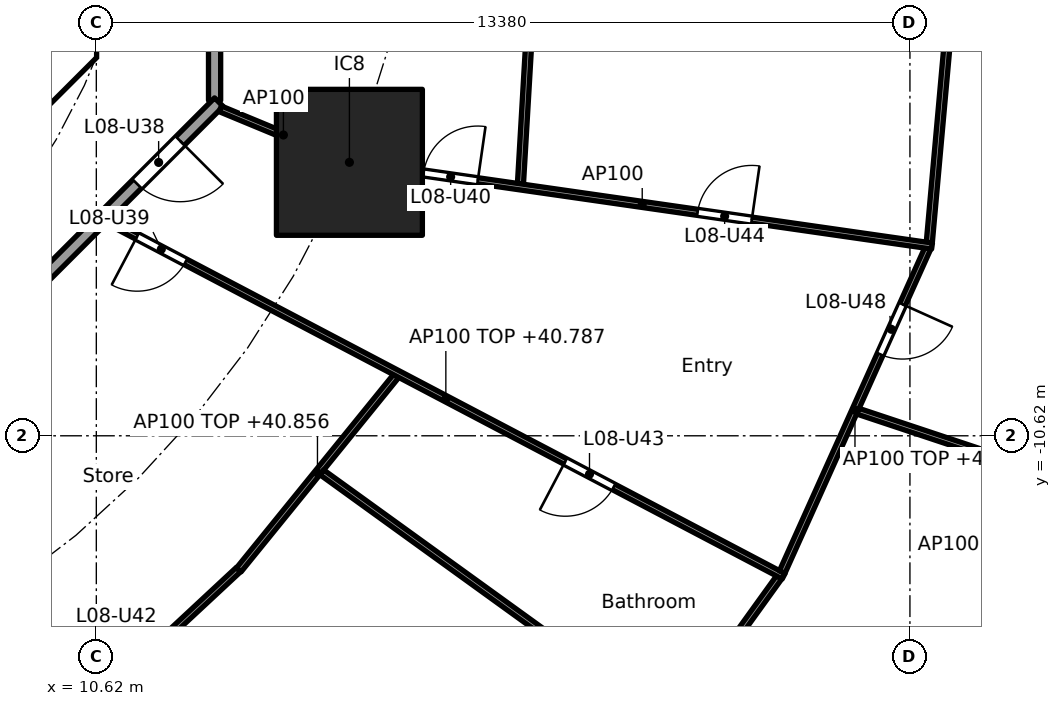
"""IFC4 building model, lengths in metres.
Left out: names, types, materials, properties, quantities, classifications, styles, units other than length and angle.
Written with IfcOpenShell. Run it as: python <this file> out.ifc"""

import sys

from ifc_helpers import new_model, si_unit, direction, frame, frame_2d, origin, origin_2d, place, context, subcontext, project, spatial, polyline, rectangle, outline, extrude, element, fill, save


model = new_model("IFC4")
c1 = context("Model", 3, precision=1e-05, world=origin(), true_north=direction((0.0, 1.0)))
c2 = subcontext(c1, "Body", "Model", "MODEL_VIEW")
j1 = project(units=[si_unit("LENGTHUNIT", "METRE"), si_unit("PLANEANGLEUNIT", "RADIAN")], contexts=[c1])
p1 = place(None, origin())
s1 = spatial("IfcSite", under=j1, at=p1, CompositionType="ELEMENT")
p2 = place(p1, origin())
s2 = spatial("IfcBuilding", under=s1, at=p2, CompositionType="ELEMENT")
p3 = place(p2, frame((0.0, 0.0, 38.1)))
s3 = spatial("IfcBuildingStorey", under=s2, at=p3, CompositionType="ELEMENT", Elevation=38.1)
p4 = place(p3, frame((14.782, -6.123, 0.0), z_axis=(0.0, 0.0, 1.0), x_axis=(1.0, 0.0, 0.0)))
e1 = element("IfcColumn", 1, at=p4, inside=s3, PredefinedType="COLUMN", context=c2, shape_type="SweptSolid", body=[
    extrude(rectangle(XDim=2.4, YDim=2.4, at=origin_2d()), origin(), (0.0, 0.0, 1.0), 3.7),
])
p5 = place(p3, frame((4.613, -9.988, 0.0), z_axis=(0.0, 0.0, 1.0), x_axis=(0.707106781187, 0.707106781187, 0.0)))
e2 = element("IfcWall", 2, at=p5, inside=s3, PredefinedType="SHEAR", context=c2, shape_type="SweptSolid", body=[
    extrude(rectangle(XDim=7.602, YDim=0.6, at=frame_2d((3.801, 0.0))), origin(), (0.0, 0.0, 1.0), 3.44),
])
p6 = place(p5, frame((3.201, 0.0, 0.0)))
e3 = element("IfcOpeningElement", 3, at=p6, cuts=e2, PredefinedType="OPENING", context=c2, shape_type="SweptSolid", body=[
    extrude(rectangle(XDim=1.2, YDim=2.1, at=frame_2d((0.6, 1.05))), frame((0.0, 0.31, 0.0), z_axis=(0.0, -1.0, 0.0), x_axis=(1.0, 0.0, 0.0)), (0.0, 0.0, 1.0), 0.62),
])
p7 = place(p3, origin())
e4 = element("IfcWall", 4, at=p7, inside=s3, PredefinedType="SHEAR", context=c2, shape_type="SweptSolid", body=[
    extrude(outline(polyline([(9.776, -4.401), (10.025, -4.152), (10.025, -3.801), (10.025, 4.152), (9.776, 4.401), (10.2, 4.825), (10.625, 4.401), (10.625, -4.401), (10.2, -4.825), (9.776, -4.401)])), origin(), (0.0, 0.0, 1.0), 3.44),
])
p8 = place(p3, frame((12.565, -5.104, 0.0), z_axis=(0.0, 0.0, 1.0), x_axis=(0.0, 1.0, 0.0)))
e5 = element("IfcWall", 5, at=p8, inside=s3, PredefinedType="PARTITIONING", context=c2, shape_type="SweptSolid", body=[
    extrude(rectangle(XDim=10.209, YDim=0.2, at=frame_2d((5.104, 0.0))), origin(), (0.0, 0.0, 1.0), 3.44),
])
p9 = place(p3, frame((5.275, -12.494, 0.0), z_axis=(0.0, 0.0, 1.0), x_axis=(0.707106781187, 0.707106781187, 0.0)))
e6 = element("IfcWall", 6, at=p9, inside=s3, PredefinedType="PARTITIONING", context=c2, shape_type="SweptSolid", body=[
    extrude(rectangle(XDim=10.409, YDim=0.2, at=frame_2d((5.205, 0.0))), origin(), (0.0, 0.0, 1.0), 3.44),
])
p10 = place(p9, frame((8.508, 0.0, 0.0)))
e7 = element("IfcOpeningElement", 7, at=p10, cuts=e6, PredefinedType="OPENING", context=c2, shape_type="SweptSolid", body=[
    extrude(rectangle(XDim=1.0, YDim=2.1, at=frame_2d((0.5, 1.05))), frame((0.0, 0.11, 0.0), z_axis=(0.0, -1.0, 0.0), x_axis=(1.0, 0.0, 0.0)), (0.0, 0.0, 1.0), 0.22),
])
p11 = place(p3, frame((17.971, -0.05, 0.0), z_axis=(0.0, 0.0, 1.0), x_axis=(-0.058475267553, -0.998288857538, 0.0)))
e8 = element("IfcWall", 8, at=p11, inside=s3, PredefinedType="PARTITIONING", context=c2, shape_type="SweptSolid", body=[
    extrude(rectangle(XDim=6.438, YDim=0.1, at=frame_2d((3.219, 0.0))), origin(), (0.0, 0.0, 1.0), 2.756),
])
p12 = place(p3, frame((24.982, -0.05, 0.0), z_axis=(0.0, 0.0, 1.0), x_axis=(-0.089432471274, -0.995992888068, 0.0)))
e9 = element("IfcWall", 9, at=p12, inside=s3, PredefinedType="PARTITIONING", context=c2, shape_type="SweptSolid", body=[
    extrude(rectangle(XDim=7.423, YDim=0.1, at=frame_2d((3.711, 0.0))), origin(), (0.0, 0.0, 1.0), 2.756),
])
p13 = place(p3, frame((7.097, -10.81, 0.0), z_axis=(0.0, 0.0, 1.0), x_axis=(0.526453266471, -0.850204068576, 0.0)))
e10 = element("IfcWall", 10, at=p13, inside=s3, PredefinedType="PARTITIONING", context=c2, shape_type="SweptSolid", body=[
    extrude(rectangle(XDim=19.85, YDim=0.1, at=frame_2d((9.925, 0.0))), origin(), (0.0, 0.0, 1.0), 2.687),
])
p14 = place(p13, frame((0.35, 0.0, 0.0)))
e11 = element("IfcOpeningElement", 11, at=p14, cuts=e10, PredefinedType="OPENING", context=c2, shape_type="SweptSolid", body=[
    extrude(rectangle(XDim=0.9, YDim=2.1, at=frame_2d((0.45, 1.05))), frame((0.0, 0.06, 0.0), z_axis=(0.0, -1.0, 0.0), x_axis=(1.0, 0.0, 0.0)), (0.0, 0.0, 1.0), 0.12),
])
p15 = place(p13, frame((8.795, 0.0, 0.0)))
e12 = element("IfcOpeningElement", 12, at=p15, cuts=e10, PredefinedType="OPENING", context=c2, shape_type="SweptSolid", body=[
    extrude(rectangle(XDim=0.9, YDim=2.1, at=frame_2d((0.45, 1.05))), frame((0.0, 0.06, 0.0), z_axis=(0.0, -1.0, 0.0), x_axis=(1.0, 0.0, 0.0)), (0.0, 0.0, 1.0), 0.12),
])
p16 = place(p13, frame((15.935, 0.0, 0.0)))
e13 = element("IfcOpeningElement", 13, at=p16, cuts=e10, PredefinedType="OPENING", context=c2, shape_type="SweptSolid", body=[
    extrude(rectangle(XDim=0.9, YDim=2.1, at=frame_2d((0.45, 1.05))), frame((0.0, 0.06, 0.0), z_axis=(0.0, -1.0, 0.0), x_axis=(1.0, 0.0, 0.0)), (0.0, 0.0, 1.0), 0.12),
])
p17 = place(p3, frame((10.066, -15.511, 0.0), z_axis=(0.0, 0.0, 1.0), x_axis=(0.732022571638, 0.681280378855, 0.0)))
e14 = element("IfcWall", 14, at=p17, inside=s3, PredefinedType="PARTITIONING", context=c2, shape_type="SweptSolid", body=[
    extrude(rectangle(XDim=3.95, YDim=0.1, at=frame_2d((1.975, 0.0))), origin(), (0.0, 0.0, 1.0), 3.44),
])
p18 = place(p17, frame((1.525, 0.0, 0.0)))
e15 = element("IfcOpeningElement", 15, at=p18, cuts=e14, PredefinedType="OPENING", context=c2, shape_type="SweptSolid", body=[
    extrude(rectangle(XDim=0.9, YDim=2.1, at=frame_2d((0.45, 1.05))), frame((0.0, 0.06, 0.0), z_axis=(0.0, -1.0, 0.0), x_axis=(1.0, 0.0, 0.0)), (0.0, 0.0, 1.0), 0.12),
])
p19 = place(p3, frame((12.963, -12.825, 0.0), z_axis=(0.0, 0.0, 1.0), x_axis=(0.63012473344, 0.776493928056, 0.0)))
e16 = element("IfcWall", 16, at=p19, inside=s3, PredefinedType="PARTITIONING", context=c2, shape_type="SweptSolid", body=[
    extrude(rectangle(XDim=4.106, YDim=0.1, at=frame_2d((2.053, 0.0))), origin(), (0.0, 0.0, 1.0), 2.756),
])
p20 = place(p3, frame((18.293, -17.884, 0.0), z_axis=(0.0, 0.0, 1.0), x_axis=(0.584558392935, 0.811351640936, 0.0)))
e17 = element("IfcWall", 17, at=p20, inside=s3, PredefinedType="PARTITIONING", context=c2, shape_type="SweptSolid", body=[
    extrude(rectangle(XDim=6.084, YDim=0.1, at=frame_2d((3.042, 0.0))), origin(), (0.0, 0.0, 1.0), 2.756),
])
p21 = place(p3, frame((14.329, -11.221, 0.0), z_axis=(0.0, 0.0, 1.0), x_axis=(0.810671130917, -0.58550176558, 0.0)))
e18 = element("IfcWall", 18, at=p21, inside=s3, PredefinedType="PARTITIONING", context=c2, shape_type="SweptSolid", body=[
    extrude(rectangle(XDim=15.106, YDim=0.1, at=frame_2d((7.553, 0.0))), origin(), (0.0, 0.0, 1.0), 2.837),
])
p22 = place(p21, frame((10.659, 0.0, 0.0)))
e19 = element("IfcOpeningElement", 19, at=p22, cuts=e18, PredefinedType="OPENING", context=c2, shape_type="SweptSolid", body=[
    extrude(rectangle(XDim=0.9, YDim=2.1, at=frame_2d((0.45, 1.05))), frame((0.0, 0.06, 0.0), z_axis=(0.0, -1.0, 0.0), x_axis=(1.0, 0.0, 0.0)), (0.0, 0.0, 1.0), 0.12),
])
p23 = place(p3, frame((10.813, -7.091, 0.0), z_axis=(0.0, 0.0, 1.0), x_axis=(0.885182649479, -0.465243674928, 0.0)))
e20 = element("IfcWall", 20, at=p23, inside=s3, PredefinedType="PARTITIONING", context=c2, shape_type="SweptSolid", body=[
    extrude(rectangle(XDim=12.551, YDim=0.1, at=frame_2d((6.275, 0.0))), origin(), (0.0, 0.0, 1.0), 2.687),
])
p24 = place(p23, frame((0.539, 0.0, 0.0)))
e21 = element("IfcOpeningElement", 21, at=p24, cuts=e20, PredefinedType="OPENING", context=c2, shape_type="SweptSolid", body=[
    extrude(rectangle(XDim=0.9, YDim=2.1, at=frame_2d((0.45, 1.05))), frame((0.0, 0.06, 0.0), z_axis=(0.0, -1.0, 0.0), x_axis=(1.0, 0.0, 0.0)), (0.0, 0.0, 1.0), 0.12),
])
p25 = place(p23, frame((8.494, 0.0, 0.0)))
e22 = element("IfcOpeningElement", 22, at=p25, cuts=e20, PredefinedType="OPENING", context=c2, shape_type="SweptSolid", body=[
    extrude(rectangle(XDim=0.9, YDim=2.1, at=frame_2d((0.45, 1.05))), frame((0.0, 0.06, 0.0), z_axis=(0.0, -1.0, 0.0), x_axis=(1.0, 0.0, 0.0)), (0.0, 0.0, 1.0), 0.12),
])
p26 = place(p3, frame((21.899, -12.861, 0.0), z_axis=(0.0, 0.0, 1.0), x_axis=(0.410197710154, 0.911996622025, 0.0)))
e23 = element("IfcWall", 23, at=p26, inside=s3, PredefinedType="PARTITIONING", context=c2, shape_type="SweptSolid", body=[
    extrude(rectangle(XDim=5.837, YDim=0.1, at=frame_2d((2.918, 0.0))), origin(), (0.0, 0.0, 1.0), 2.756),
])
p27 = place(p26, frame((3.928, 0.0, 0.0)))
e24 = element("IfcOpeningElement", 24, at=p27, cuts=e23, PredefinedType="OPENING", context=c2, shape_type="SweptSolid", body=[
    extrude(rectangle(XDim=0.9, YDim=2.1, at=frame_2d((0.45, 1.05))), frame((0.0, 0.06, 0.0), z_axis=(0.0, -1.0, 0.0), x_axis=(1.0, 0.0, 0.0)), (0.0, 0.0, 1.0), 0.12),
])
p28 = place(p3, frame((23.144, -10.216, 0.0), z_axis=(0.0, 0.0, 1.0), x_axis=(0.948811715359, -0.315842253027, 0.0)))
e25 = element("IfcWall", 25, at=p28, inside=s3, PredefinedType="PARTITIONING", context=c2, shape_type="SweptSolid", body=[
    extrude(rectangle(XDim=7.6, YDim=0.1, at=frame_2d((3.8, 0.0))), origin(), (0.0, 0.0, 1.0), 2.837),
])
p29 = place(p3, frame((12.657, -5.243, 0.0), z_axis=(0.0, 0.0, 1.0), x_axis=(0.923864733477, -0.382719158442, 0.0)))
e26 = element("IfcWall", 26, at=p29, inside=s3, PredefinedType="PARTITIONING", context=c2, shape_type="SweptSolid", body=[
    extrude(rectangle(XDim=2.25, YDim=0.1, at=frame_2d((1.125, 0.0))), origin(), (0.0, 0.0, 1.0), 3.44),
])
p30 = place(p3, frame((14.832, -6.13, 0.0), z_axis=(0.0, 0.0, 1.0), x_axis=(0.989837122016, -0.142205737856, 0.0)))
e27 = element("IfcWall", 27, at=p30, inside=s3, PredefinedType="PARTITIONING", context=c2, shape_type="SweptSolid", body=[
    extrude(rectangle(XDim=9.63, YDim=0.1, at=frame_2d((4.815, 0.0))), origin(), (0.0, 0.0, 1.0), 3.44),
])
p31 = place(p30, frame((1.182, 0.0, 0.0)))
e28 = element("IfcOpeningElement", 28, at=p31, cuts=e27, PredefinedType="OPENING", context=c2, shape_type="SweptSolid", body=[
    extrude(rectangle(XDim=0.9, YDim=2.1, at=frame_2d((0.45, 1.05))), frame((0.0, 0.06, 0.0), z_axis=(0.0, -1.0, 0.0), x_axis=(1.0, 0.0, 0.0)), (0.0, 0.0, 1.0), 0.12),
])
p32 = place(p30, frame((5.734, 0.0, 0.0)))
e29 = element("IfcOpeningElement", 29, at=p32, cuts=e27, PredefinedType="OPENING", context=c2, shape_type="SweptSolid", body=[
    extrude(rectangle(XDim=0.9, YDim=2.1, at=frame_2d((0.45, 1.05))), frame((0.0, 0.06, 0.0), z_axis=(0.0, -1.0, 0.0), x_axis=(1.0, 0.0, 0.0)), (0.0, 0.0, 1.0), 0.12),
])
p33 = place(p10, frame((1.0, 0.0, 0.0), x_axis=(-1.0, 0.0, 0.0)))
e30 = element("IfcDoor", 30, at=p33, inside=s3, OperationType="SINGLE_SWING_LEFT", PredefinedType="DOOR", context=c2, shape_type="SweptSolid", body=[
    extrude(rectangle(XDim=1.0, YDim=2.1, at=frame_2d((0.5, 1.05))), frame((0.0, 0.025, 0.0), z_axis=(0.0, -1.0, 0.0), x_axis=(1.0, 0.0, 0.0)), (0.0, 0.0, 1.0), 0.05),
])
fill(e7, e30)
p34 = place(p24, frame((0.9, 0.0, 0.0), x_axis=(-1.0, 0.0, 0.0)))
e31 = element("IfcDoor", 31, at=p34, inside=s3, OperationType="SINGLE_SWING_RIGHT", PredefinedType="DOOR", context=c2, shape_type="SweptSolid", body=[
    extrude(rectangle(XDim=0.9, YDim=2.1, at=frame_2d((0.45, 1.05))), frame((0.0, 0.025, 0.0), z_axis=(0.0, -1.0, 0.0), x_axis=(1.0, 0.0, 0.0)), (0.0, 0.0, 1.0), 0.05),
])
fill(e21, e31)
p35 = place(p31, origin())
e32 = element("IfcDoor", 32, at=p35, inside=s3, OperationType="SINGLE_SWING_RIGHT", PredefinedType="DOOR", context=c2, shape_type="SweptSolid", body=[
    extrude(rectangle(XDim=0.9, YDim=2.1, at=frame_2d((0.45, 1.05))), frame((0.0, 0.025, 0.0), z_axis=(0.0, -1.0, 0.0), x_axis=(1.0, 0.0, 0.0)), (0.0, 0.0, 1.0), 0.05),
])
fill(e28, e32)
p36 = place(p25, frame((0.9, 0.0, 0.0), x_axis=(-1.0, 0.0, 0.0)))
e33 = element("IfcDoor", 33, at=p36, inside=s3, OperationType="SINGLE_SWING_RIGHT", PredefinedType="DOOR", context=c2, shape_type="SweptSolid", body=[
    extrude(rectangle(XDim=0.9, YDim=2.1, at=frame_2d((0.45, 1.05))), frame((0.0, 0.025, 0.0), z_axis=(0.0, -1.0, 0.0), x_axis=(1.0, 0.0, 0.0)), (0.0, 0.0, 1.0), 0.05),
])
fill(e22, e33)
p37 = place(p32, origin())
e34 = element("IfcDoor", 34, at=p37, inside=s3, OperationType="SINGLE_SWING_RIGHT", PredefinedType="DOOR", context=c2, shape_type="SweptSolid", body=[
    extrude(rectangle(XDim=0.9, YDim=2.1, at=frame_2d((0.45, 1.05))), frame((0.0, 0.025, 0.0), z_axis=(0.0, -1.0, 0.0), x_axis=(1.0, 0.0, 0.0)), (0.0, 0.0, 1.0), 0.05),
])
fill(e29, e34)
p38 = place(p27, frame((0.9, 0.0, 0.0), x_axis=(-1.0, 0.0, 0.0)))
e35 = element("IfcDoor", 35, at=p38, inside=s3, OperationType="SINGLE_SWING_LEFT", PredefinedType="DOOR", context=c2, shape_type="SweptSolid", body=[
    extrude(rectangle(XDim=0.9, YDim=2.1, at=frame_2d((0.45, 1.05))), frame((0.0, 0.025, 0.0), z_axis=(0.0, -1.0, 0.0), x_axis=(1.0, 0.0, 0.0)), (0.0, 0.0, 1.0), 0.05),
])
fill(e24, e35)
save(model, sys.argv[1])
